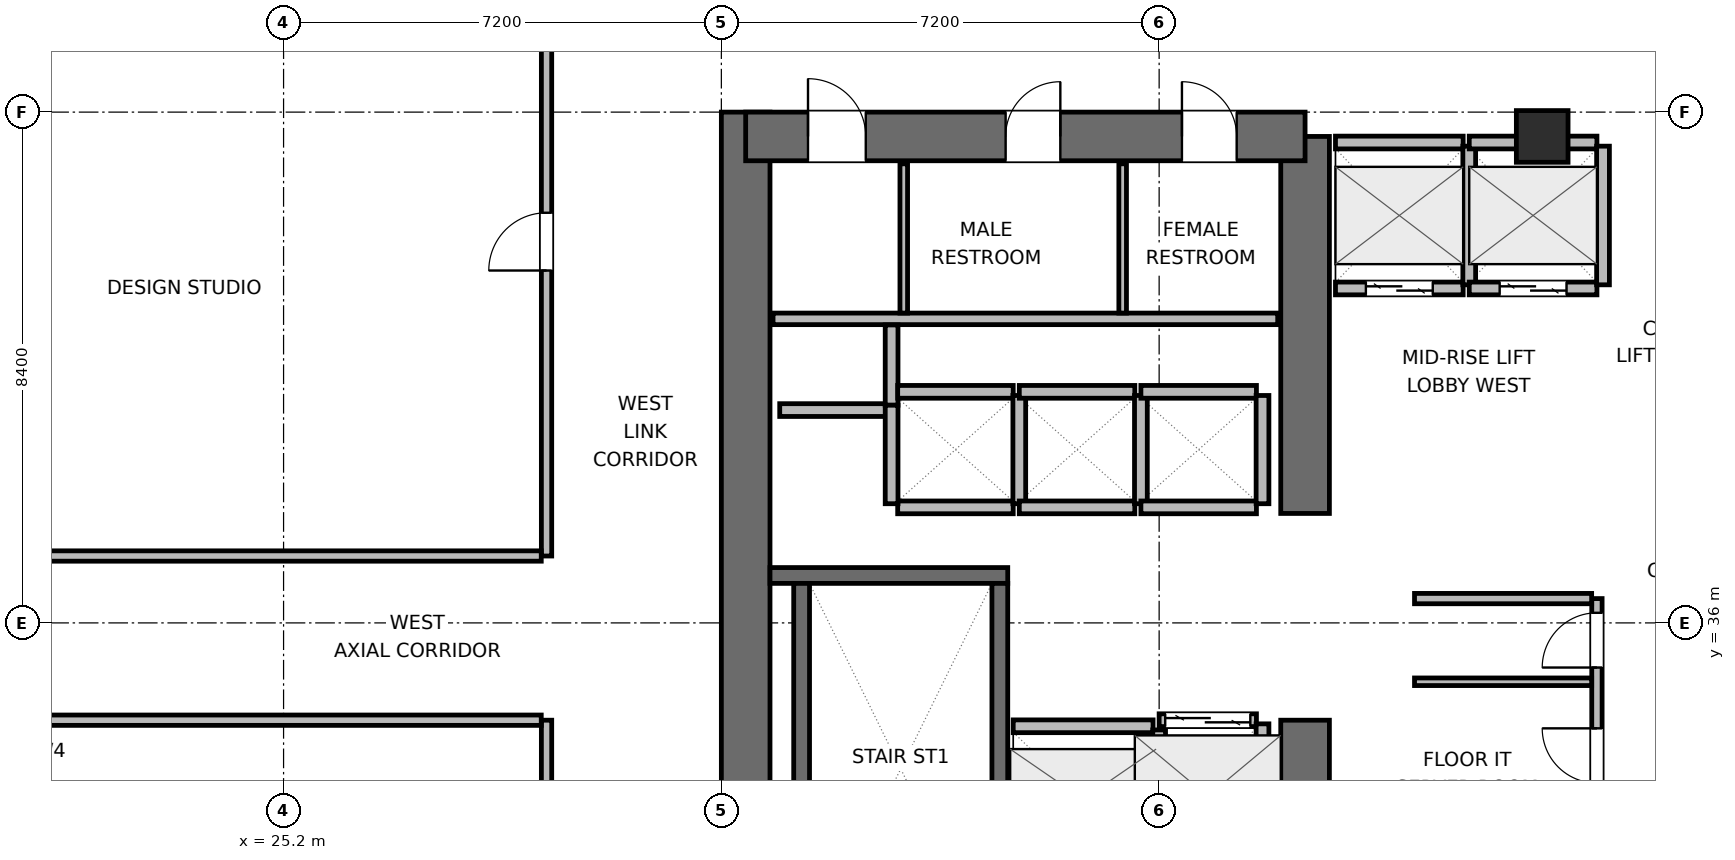
"""IFC4 building model, lengths in metres.
Left out: names, types, materials, properties, quantities, classifications, styles, units other than length and angle.
Written with IfcOpenShell. Run it as: python <this file> out.ifc"""

import sys

from ifc_helpers import new_model, si_unit, direction, frame, frame_2d, origin, origin_2d, place, context, subcontext, project, spatial, rectangle, extrude, element, fill, save


model = new_model("IFC4")
c1 = context("Model", 3, precision=1e-05, world=origin(), true_north=direction((0.0, 1.0)))
c2 = subcontext(c1, "Body", "Model", "MODEL_VIEW")
j1 = project(units=[si_unit("LENGTHUNIT", "METRE"), si_unit("PLANEANGLEUNIT", "RADIAN")], contexts=[c1])
p1 = place(None, origin())
s1 = spatial("IfcSite", under=j1, at=p1, CompositionType="ELEMENT")
p2 = place(p1, origin())
s2 = spatial("IfcBuilding", under=s1, at=p2, CompositionType="ELEMENT")
p3 = place(p2, frame((0.0, 0.0, 174.0)))
s3 = spatial("IfcBuildingStorey", under=s2, at=p3, CompositionType="ELEMENT", Elevation=174.0)
p4 = place(p3, frame((32.8, 27.6, 0.0), z_axis=(0.0, 0.0, 1.0), x_axis=(0.0, 1.0, 0.0)))
e1 = element("IfcWall", 1, at=p4, inside=s3, PredefinedType="SHEAR", context=c2, shape_type="SweptSolid", body=[
    extrude(rectangle(XDim=16.8, YDim=0.8, at=frame_2d((8.4, 0.0))), origin(), (0.0, 0.0, 1.0), 3.9),
])
p5 = place(p3, frame((42.0, 28.0, 0.0), z_axis=(0.0, 0.0, 1.0), x_axis=(0.0, 1.0, 0.0)))
e2 = element("IfcWall", 2, at=p5, inside=s3, PredefinedType="SHEAR", context=c2, shape_type="SweptSolid", body=[
    extrude(rectangle(XDim=6.4, YDim=0.8, at=frame_2d((3.2, 0.0))), origin(), (0.0, 0.0, 1.0), 3.9),
])
p6 = place(p3, frame((42.0, 37.8, 0.0), z_axis=(0.0, 0.0, 1.0), x_axis=(0.0, 1.0, 0.0)))
e3 = element("IfcWall", 3, at=p6, inside=s3, PredefinedType="SHEAR", context=c2, shape_type="SweptSolid", body=[
    extrude(rectangle(XDim=6.2, YDim=0.8, at=frame_2d((3.1, 0.0))), origin(), (0.0, 0.0, 1.0), 3.9),
])
p7 = place(p3, frame((32.8, 44.0, 0.0), z_axis=(0.0, 0.0, 1.0), x_axis=(1.0, 0.0, 0.0)))
e4 = element("IfcWall", 4, at=p7, inside=s3, PredefinedType="SHEAR", context=c2, shape_type="SweptSolid", body=[
    extrude(rectangle(XDim=9.2, YDim=0.8, at=frame_2d((4.6, 0.0))), origin(), (0.0, 0.0, 1.0), 3.9),
])
p8 = place(p7, frame((1.025, 0.0, 0.0)))
e5 = element("IfcOpeningElement", 5, at=p8, cuts=e4, PredefinedType="OPENING", context=c2, shape_type="SweptSolid", body=[
    extrude(rectangle(XDim=0.95, YDim=2.04, at=frame_2d((0.475, 1.02))), frame((0.0, 0.41, 0.0), z_axis=(0.0, -1.0, 0.0), x_axis=(1.0, 0.0, 0.0)), (0.0, 0.0, 1.0), 0.82),
])
p9 = place(p7, frame((4.275, 0.0, 0.0)))
e6 = element("IfcOpeningElement", 6, at=p9, cuts=e4, PredefinedType="OPENING", context=c2, shape_type="SweptSolid", body=[
    extrude(rectangle(XDim=0.9, YDim=2.02, at=frame_2d((0.45, 1.01))), frame((0.0, 0.41, 0.0), z_axis=(0.0, -1.0, 0.0), x_axis=(1.0, 0.0, 0.0)), (0.0, 0.0, 1.0), 0.82),
])
p10 = place(p7, frame((7.175, 0.0, 0.0)))
e7 = element("IfcOpeningElement", 7, at=p10, cuts=e4, PredefinedType="OPENING", context=c2, shape_type="SweptSolid", body=[
    extrude(rectangle(XDim=0.9, YDim=2.02, at=frame_2d((0.45, 1.01))), frame((0.0, 0.41, 0.0), z_axis=(0.0, -1.0, 0.0), x_axis=(1.0, 0.0, 0.0)), (0.0, 0.0, 1.0), 0.82),
])
p11 = place(p3, frame((33.2, 36.78, 0.0), z_axis=(0.0, 0.0, 1.0), x_axis=(1.0, 0.0, 0.0)))
e8 = element("IfcWall", 8, at=p11, inside=s3, PredefinedType="SHEAR", context=c2, shape_type="SweptSolid", body=[
    extrude(rectangle(XDim=3.91, YDim=0.26, at=frame_2d((1.955, 0.0))), origin(), (0.0, 0.0, 1.0), 3.9),
])
p12 = place(p3, frame((33.72, 29.05, 0.0), z_axis=(0.0, 0.0, 1.0), x_axis=(0.0, 1.0, 0.0)))
e9 = element("IfcWall", 9, at=p12, inside=s3, PredefinedType="SHEAR", context=c2, shape_type="SweptSolid", body=[
    extrude(rectangle(XDim=7.6, YDim=0.26, at=frame_2d((3.8, 0.0))), origin(), (0.0, 0.0, 1.0), 3.9),
])
p13 = place(p3, frame((36.98, 29.05, 0.0), z_axis=(0.0, 0.0, 1.0), x_axis=(0.0, 1.0, 0.0)))
e10 = element("IfcWall", 10, at=p13, inside=s3, PredefinedType="SHEAR", context=c2, shape_type="SweptSolid", body=[
    extrude(rectangle(XDim=7.6, YDim=0.26, at=frame_2d((3.8, 0.0))), origin(), (0.0, 0.0, 1.0), 3.9),
])
p14 = place(p13, frame((0.3, 0.0, 0.0)))
e11 = element("IfcOpeningElement", 11, at=p14, cuts=e10, PredefinedType="OPENING", context=c2, shape_type="SweptSolid", body=[
    extrude(rectangle(XDim=1.0, YDim=2.04, at=frame_2d((0.5, 1.02))), frame((0.0, 0.14, 0.0), z_axis=(0.0, -1.0, 0.0), x_axis=(1.0, 0.0, 0.0)), (0.0, 0.0, 1.0), 0.28),
])
p15 = place(p3, frame((45.9, 44.0, 0.0), z_axis=(0.0, 0.0, 1.0), x_axis=(1.0, 0.0, 0.0)))
e12 = element("IfcColumn", 12, at=p15, inside=s3, PredefinedType="COLUMN", context=c2, shape_type="SweptSolid", body=[
    extrude(rectangle(XDim=0.85, YDim=0.85, at=origin_2d()), origin(), (0.0, 0.0, 1.0), 3.9),
])
p16 = place(p3, frame((33.25, 41.0, 0.0), z_axis=(0.0, 0.0, 1.0), x_axis=(1.0, 0.0, 0.0)))
e13 = element("IfcWall", 13, at=p16, inside=s3, PredefinedType="PLUMBINGWALL", context=c2, shape_type="SweptSolid", body=[
    extrude(rectangle(XDim=8.3, YDim=0.19, at=frame_2d((4.15, 0.0))), origin(), (0.0, 0.0, 1.0), 3.68),
])
for number, where, z_axis, x_axis in (
    (14, (35.4, 41.095, 0.0), (0.0, 0.0, 1.0), (0.0, 1.0, 0.0)),
    (15, (39.0, 41.095, 0.0), (0.0, 0.0, 1.0), (0.0, 1.0, 0.0)),
):
    element("IfcWall", number, at=place(p3, frame(where, z_axis=z_axis, x_axis=x_axis)), inside=s3, PredefinedType="PARTITIONING", context=c2, shape_type="SweptSolid", body=[
        extrude(rectangle(XDim=2.455, YDim=0.125, at=frame_2d((1.228, 0.0))), origin(), (0.0, 0.0, 1.0), 3.68),
    ])
p17 = place(p3, frame((33.36, 39.5, 0.0), z_axis=(0.0, 0.0, 1.0), x_axis=(1.0, 0.0, 0.0)))
e16 = element("IfcWall", 16, at=p17, inside=s3, PredefinedType="PARTITIONING", context=c2, shape_type="SweptSolid", body=[
    extrude(rectangle(XDim=1.86, YDim=0.21, at=frame_2d((0.93, 0.0))), origin(), (0.0, 0.0, 1.0), 3.68),
])
p18 = place(p3, frame((35.2, 39.58, 0.0), z_axis=(0.0, 0.0, 1.0), x_axis=(0.0, 1.0, 0.0)))
e17 = element("IfcWall", 17, at=p18, inside=s3, PredefinedType="PARTITIONING", context=c2, shape_type="SweptSolid", body=[
    extrude(rectangle(XDim=1.32, YDim=0.21, at=frame_2d((0.66, 0.0))), origin(), (0.0, 0.0, 1.0), 3.68),
])
p19 = place(p3, frame((37.2, 34.3, 0.0), z_axis=(0.0, 0.0, 1.0), x_axis=(1.0, 0.0, 0.0)))
e18 = element("IfcWall", 18, at=p19, inside=s3, PredefinedType="PARTITIONING", context=c2, shape_type="SweptSolid", body=[
    extrude(rectangle(XDim=2.3, YDim=0.21, at=frame_2d((1.15, 0.0))), origin(), (0.0, 0.0, 1.0), 3.68),
])
p20 = place(p3, frame((39.6, 31.96, 0.0), z_axis=(0.0, 0.0, 1.0), x_axis=(0.0, 1.0, 0.0)))
e19 = element("IfcWall", 19, at=p20, inside=s3, PredefinedType="PARTITIONING", context=c2, shape_type="SweptSolid", body=[
    extrude(rectangle(XDim=2.28, YDim=0.21, at=frame_2d((1.14, 0.0))), origin(), (0.0, 0.0, 1.0), 3.68),
])
p21 = place(p3, frame((39.6, 34.4, 0.0), z_axis=(0.0, 0.0, 1.0), x_axis=(1.0, 0.0, 0.0)))
e20 = element("IfcWall", 20, at=p21, inside=s3, PredefinedType="PARTITIONING", context=c2, shape_type="SweptSolid", body=[
    extrude(rectangle(XDim=1.6, YDim=0.21, at=frame_2d((0.8, 0.0))), origin(), (0.0, 0.0, 1.0), 3.68),
])
p22 = place(p21, frame((0.1, 0.0, 0.0)))
e21 = element("IfcOpeningElement", 21, at=p22, cuts=e20, PredefinedType="OPENING", context=c2, shape_type="SweptSolid", body=[
    extrude(rectangle(XDim=1.4, YDim=2.06, at=frame_2d((0.7, 1.03))), frame((0.0, 0.115, 0.0), z_axis=(0.0, -1.0, 0.0), x_axis=(1.0, 0.0, 0.0)), (0.0, 0.0, 1.0), 0.23),
])
p23 = place(p3, frame((41.3, 31.96, 0.0), z_axis=(0.0, 0.0, 1.0), x_axis=(0.0, 1.0, 0.0)))
e22 = element("IfcWall", 22, at=p23, inside=s3, PredefinedType="PARTITIONING", context=c2, shape_type="SweptSolid", body=[
    extrude(rectangle(XDim=2.38, YDim=0.21, at=frame_2d((1.19, 0.0))), origin(), (0.0, 0.0, 1.0), 3.68),
])
p24 = place(p3, frame((42.5, 41.5, 0.0), z_axis=(0.0, 0.0, 1.0), x_axis=(1.0, 0.0, 0.0)))
e23 = element("IfcWall", 23, at=p24, inside=s3, PredefinedType="PARTITIONING", context=c2, shape_type="SweptSolid", body=[
    extrude(rectangle(XDim=2.1, YDim=0.21, at=frame_2d((1.05, 0.0))), origin(), (0.0, 0.0, 1.0), 3.68),
])
p25 = place(p24, frame((0.5, 0.0, 0.0)))
e24 = element("IfcOpeningElement", 24, at=p25, cuts=e23, PredefinedType="OPENING", context=c2, shape_type="SweptSolid", body=[
    extrude(rectangle(XDim=1.1, YDim=2.04, at=frame_2d((0.55, 1.02))), frame((0.0, 0.115, 0.0), z_axis=(0.0, -1.0, 0.0), x_axis=(1.0, 0.0, 0.0)), (0.0, 0.0, 1.0), 0.23),
])
p26 = place(p3, frame((42.5, 43.9, 0.0), z_axis=(0.0, 0.0, 1.0), x_axis=(1.0, 0.0, 0.0)))
e25 = element("IfcWall", 25, at=p26, inside=s3, PredefinedType="PARTITIONING", context=c2, shape_type="SweptSolid", body=[
    extrude(rectangle(XDim=2.1, YDim=0.21, at=frame_2d((1.05, 0.0))), origin(), (0.0, 0.0, 1.0), 2.765),
])
p27 = place(p3, frame((44.7, 41.56, 0.0), z_axis=(0.0, 0.0, 1.0), x_axis=(0.0, 1.0, 0.0)))
e26 = element("IfcWall", 26, at=p27, inside=s3, PredefinedType="PARTITIONING", context=c2, shape_type="SweptSolid", body=[
    extrude(rectangle(XDim=2.28, YDim=0.21, at=frame_2d((1.14, 0.0))), origin(), (0.0, 0.0, 1.0), 3.68),
])
p28 = place(p3, frame((44.7, 41.5, 0.0), z_axis=(0.0, 0.0, 1.0), x_axis=(1.0, 0.0, 0.0)))
e27 = element("IfcWall", 27, at=p28, inside=s3, PredefinedType="PARTITIONING", context=c2, shape_type="SweptSolid", body=[
    extrude(rectangle(XDim=2.1, YDim=0.21, at=frame_2d((1.05, 0.0))), origin(), (0.0, 0.0, 1.0), 3.68),
])
p29 = place(p28, frame((0.5, 0.0, 0.0)))
e28 = element("IfcOpeningElement", 28, at=p29, cuts=e27, PredefinedType="OPENING", context=c2, shape_type="SweptSolid", body=[
    extrude(rectangle(XDim=1.1, YDim=2.04, at=frame_2d((0.55, 1.02))), frame((0.0, 0.115, 0.0), z_axis=(0.0, -1.0, 0.0), x_axis=(1.0, 0.0, 0.0)), (0.0, 0.0, 1.0), 0.23),
])
p30 = place(p3, frame((44.7, 43.9, 0.0), z_axis=(0.0, 0.0, 1.0), x_axis=(1.0, 0.0, 0.0)))
e29 = element("IfcWall", 29, at=p30, inside=s3, PredefinedType="PARTITIONING", context=c2, shape_type="SweptSolid", body=[
    extrude(rectangle(XDim=2.1, YDim=0.21, at=frame_2d((1.05, 0.0))), origin(), (0.0, 0.0, 1.0), 2.765),
])
p31 = place(p3, frame((46.9, 41.56, 0.0), z_axis=(0.0, 0.0, 1.0), x_axis=(0.0, 1.0, 0.0)))
e30 = element("IfcWall", 30, at=p31, inside=s3, PredefinedType="PARTITIONING", context=c2, shape_type="SweptSolid", body=[
    extrude(rectangle(XDim=2.28, YDim=0.21, at=frame_2d((1.14, 0.0))), origin(), (0.0, 0.0, 1.0), 3.68),
])
for number, where, z_axis, x_axis in (
    (31, (35.3, 37.9, 0.0), (0.0, 0.0, 1.0), (1.0, 0.0, 0.0)),
    (32, (35.3, 39.8, 0.0), (0.0, 0.0, 1.0), (1.0, 0.0, 0.0)),
):
    element("IfcWall", number, at=place(p3, frame(where, z_axis=z_axis, x_axis=x_axis)), inside=s3, PredefinedType="PARTITIONING", context=c2, shape_type="SweptSolid", body=[
        extrude(rectangle(XDim=1.9, YDim=0.21, at=frame_2d((0.95, 0.0))), origin(), (0.0, 0.0, 1.0), 3.68),
    ])
p32 = place(p3, frame((35.2, 37.96, 0.0), z_axis=(0.0, 0.0, 1.0), x_axis=(0.0, 1.0, 0.0)))
e33 = element("IfcWall", 33, at=p32, inside=s3, PredefinedType="PARTITIONING", context=c2, shape_type="SweptSolid", body=[
    extrude(rectangle(XDim=1.62, YDim=0.21, at=frame_2d((0.81, 0.0))), origin(), (0.0, 0.0, 1.0), 3.68),
])
p33 = place(p3, frame((37.3, 37.96, 0.0), z_axis=(0.0, 0.0, 1.0), x_axis=(0.0, 1.0, 0.0)))
e34 = element("IfcWall", 34, at=p33, inside=s3, PredefinedType="PARTITIONING", context=c2, shape_type="SweptSolid", body=[
    extrude(rectangle(XDim=1.78, YDim=0.21, at=frame_2d((0.89, 0.0))), origin(), (0.0, 0.0, 1.0), 3.68),
])
for number, where, z_axis, x_axis in (
    (35, (37.3, 37.9, 0.0), (0.0, 0.0, 1.0), (1.0, 0.0, 0.0)),
    (36, (37.3, 39.8, 0.0), (0.0, 0.0, 1.0), (1.0, 0.0, 0.0)),
):
    element("IfcWall", number, at=place(p3, frame(where, z_axis=z_axis, x_axis=x_axis)), inside=s3, PredefinedType="PARTITIONING", context=c2, shape_type="SweptSolid", body=[
        extrude(rectangle(XDim=1.9, YDim=0.21, at=frame_2d((0.95, 0.0))), origin(), (0.0, 0.0, 1.0), 3.68),
    ])
p34 = place(p3, frame((39.3, 37.96, 0.0), z_axis=(0.0, 0.0, 1.0), x_axis=(0.0, 1.0, 0.0)))
e37 = element("IfcWall", 37, at=p34, inside=s3, PredefinedType="PARTITIONING", context=c2, shape_type="SweptSolid", body=[
    extrude(rectangle(XDim=1.78, YDim=0.21, at=frame_2d((0.89, 0.0))), origin(), (0.0, 0.0, 1.0), 3.68),
])
for number, where, z_axis, x_axis in (
    (38, (39.3, 37.9, 0.0), (0.0, 0.0, 1.0), (1.0, 0.0, 0.0)),
    (39, (39.3, 39.8, 0.0), (0.0, 0.0, 1.0), (1.0, 0.0, 0.0)),
):
    element("IfcWall", number, at=place(p3, frame(where, z_axis=z_axis, x_axis=x_axis)), inside=s3, PredefinedType="PARTITIONING", context=c2, shape_type="SweptSolid", body=[
        extrude(rectangle(XDim=1.9, YDim=0.21, at=frame_2d((0.95, 0.0))), origin(), (0.0, 0.0, 1.0), 3.68),
    ])
p35 = place(p3, frame((41.3, 37.96, 0.0), z_axis=(0.0, 0.0, 1.0), x_axis=(0.0, 1.0, 0.0)))
e40 = element("IfcWall", 40, at=p35, inside=s3, PredefinedType="PARTITIONING", context=c2, shape_type="SweptSolid", body=[
    extrude(rectangle(XDim=1.78, YDim=0.21, at=frame_2d((0.89, 0.0))), origin(), (0.0, 0.0, 1.0), 3.68),
])
p36 = place(p3, frame((46.8, 32.6, 0.0), z_axis=(0.0, 0.0, 1.0), x_axis=(0.0, 1.0, 0.0)))
e41 = element("IfcWall", 41, at=p36, inside=s3, PredefinedType="PARTITIONING", context=c2, shape_type="SweptSolid", body=[
    extrude(rectangle(XDim=3.8, YDim=0.17, at=frame_2d((1.9, 0.0))), origin(), (0.0, 0.0, 1.0), 3.68),
])
p37 = place(p36, frame((0.766, 0.0, 0.0)))
e42 = element("IfcOpeningElement", 42, at=p37, cuts=e41, PredefinedType="OPENING", context=c2, shape_type="SweptSolid", body=[
    extrude(rectangle(XDim=0.9, YDim=2.02, at=frame_2d((0.45, 1.01))), frame((0.0, 0.095, 0.0), z_axis=(0.0, -1.0, 0.0), x_axis=(1.0, 0.0, 0.0)), (0.0, 0.0, 1.0), 0.19),
])
p38 = place(p36, frame((2.666, 0.0, 0.0)))
e43 = element("IfcOpeningElement", 43, at=p38, cuts=e41, PredefinedType="OPENING", context=c2, shape_type="SweptSolid", body=[
    extrude(rectangle(XDim=0.9, YDim=2.02, at=frame_2d((0.45, 1.01))), frame((0.0, 0.095, 0.0), z_axis=(0.0, -1.0, 0.0), x_axis=(1.0, 0.0, 0.0)), (0.0, 0.0, 1.0), 0.19),
])
p39 = place(p3, frame((43.8, 36.4, 0.0), z_axis=(0.0, 0.0, 1.0), x_axis=(1.0, 0.0, 0.0)))
e44 = element("IfcWall", 44, at=p39, inside=s3, PredefinedType="PARTITIONING", context=c2, shape_type="SweptSolid", body=[
    extrude(rectangle(XDim=2.913, YDim=0.17, at=frame_2d((1.457, 0.0))), origin(), (0.0, 0.0, 1.0), 3.68),
])
p40 = place(p3, frame((43.8, 35.032, 0.0), z_axis=(0.0, 0.0, 1.0), x_axis=(1.0, 0.0, 0.0)))
e45 = element("IfcWall", 45, at=p40, inside=s3, PredefinedType="PARTITIONING", context=c2, shape_type="SweptSolid", body=[
    extrude(rectangle(XDim=2.913, YDim=0.125, at=frame_2d((1.457, 0.0))), origin(), (0.0, 0.0, 1.0), 3.68),
])
p41 = place(p3, frame((29.525, 24.647, 0.0), z_axis=(0.0, 0.0, 1.0), x_axis=(0.0, 1.0, 0.0)))
e46 = element("IfcWall", 46, at=p41, inside=s3, PredefinedType="PARTITIONING", context=c2, shape_type="SweptSolid", body=[
    extrude(rectangle(XDim=9.753, YDim=0.17, at=frame_2d((4.876, 0.0))), origin(), (0.0, 0.0, 1.0), 3.68),
])
p42 = place(p41, frame((4.358, 0.0, 0.0)))
e47 = element("IfcOpeningElement", 47, at=p42, cuts=e46, PredefinedType="OPENING", context=c2, shape_type="SweptSolid", body=[
    extrude(rectangle(XDim=0.95, YDim=2.04, at=frame_2d((0.475, 1.02))), frame((0.0, 0.095, 0.0), z_axis=(0.0, -1.0, 0.0), x_axis=(1.0, 0.0, 0.0)), (0.0, 0.0, 1.0), 0.19),
])
p43 = place(p3, frame((29.525, 37.1, 0.0), z_axis=(0.0, 0.0, 1.0), x_axis=(0.0, 1.0, 0.0)))
e48 = element("IfcWall", 48, at=p43, inside=s3, PredefinedType="PARTITIONING", context=c2, shape_type="SweptSolid", body=[
    extrude(rectangle(XDim=10.253, YDim=0.17, at=frame_2d((5.126, 0.0))), origin(), (0.0, 0.0, 1.0), 3.68),
])
p44 = place(p43, frame((4.695, 0.0, 0.0)))
e49 = element("IfcOpeningElement", 49, at=p44, cuts=e48, PredefinedType="OPENING", context=c2, shape_type="SweptSolid", body=[
    extrude(rectangle(XDim=0.95, YDim=2.04, at=frame_2d((0.475, 1.02))), frame((0.0, 0.095, 0.0), z_axis=(0.0, -1.0, 0.0), x_axis=(1.0, 0.0, 0.0)), (0.0, 0.0, 1.0), 0.19),
])
p45 = place(p3, frame((20.24, 34.4, 0.0), z_axis=(0.0, 0.0, 1.0), x_axis=(1.0, 0.0, 0.0)))
e50 = element("IfcWall", 50, at=p45, inside=s3, PredefinedType="PARTITIONING", context=c2, shape_type="SweptSolid", body=[
    extrude(rectangle(XDim=9.198, YDim=0.17, at=frame_2d((4.599, 0.0))), origin(), (0.0, 0.0, 1.0), 3.68),
])
p46 = place(p3, frame((18.225, 37.1, 0.0), z_axis=(0.0, 0.0, 1.0), x_axis=(1.0, 0.0, 0.0)))
e51 = element("IfcWall", 51, at=p46, inside=s3, PredefinedType="PARTITIONING", context=c2, shape_type="SweptSolid", body=[
    extrude(rectangle(XDim=11.213, YDim=0.17, at=frame_2d((5.606, 0.0))), origin(), (0.0, 0.0, 1.0), 3.68),
])
p47 = place(p22, origin())
e52 = element("IfcDoor", 52, at=p47, inside=s3, OperationType="DOUBLE_DOOR_SLIDING", PredefinedType="DOOR", context=c2, shape_type="SweptSolid", body=[
    extrude(rectangle(XDim=1.4, YDim=2.06, at=frame_2d((0.7, 1.03))), frame((0.0, 0.025, 0.0), z_axis=(0.0, -1.0, 0.0), x_axis=(1.0, 0.0, 0.0)), (0.0, 0.0, 1.0), 0.05),
])
fill(e21, e52)
p48 = place(p25, origin())
e53 = element("IfcDoor", 53, at=p48, inside=s3, OperationType="DOUBLE_DOOR_SLIDING", PredefinedType="DOOR", context=c2, shape_type="SweptSolid", body=[
    extrude(rectangle(XDim=1.1, YDim=2.04, at=frame_2d((0.55, 1.02))), frame((0.0, 0.025, 0.0), z_axis=(0.0, -1.0, 0.0), x_axis=(1.0, 0.0, 0.0)), (0.0, 0.0, 1.0), 0.05),
])
fill(e24, e53)
p49 = place(p29, origin())
e54 = element("IfcDoor", 54, at=p49, inside=s3, OperationType="DOUBLE_DOOR_SLIDING", PredefinedType="DOOR", context=c2, shape_type="SweptSolid", body=[
    extrude(rectangle(XDim=1.1, YDim=2.04, at=frame_2d((0.55, 1.02))), frame((0.0, 0.025, 0.0), z_axis=(0.0, -1.0, 0.0), x_axis=(1.0, 0.0, 0.0)), (0.0, 0.0, 1.0), 0.05),
])
fill(e28, e54)
p50 = place(p8, origin())
e55 = element("IfcDoor", 55, at=p50, inside=s3, OperationType="SINGLE_SWING_LEFT", PredefinedType="DOOR", context=c2, shape_type="SweptSolid", body=[
    extrude(rectangle(XDim=0.95, YDim=2.04, at=frame_2d((0.475, 1.02))), frame((0.0, 0.025, 0.0), z_axis=(0.0, -1.0, 0.0), x_axis=(1.0, 0.0, 0.0)), (0.0, 0.0, 1.0), 0.05),
])
fill(e5, e55)
p51 = place(p9, origin())
e56 = element("IfcDoor", 56, at=p51, inside=s3, OperationType="SINGLE_SWING_RIGHT", PredefinedType="DOOR", context=c2, shape_type="SweptSolid", body=[
    extrude(rectangle(XDim=0.9, YDim=2.02, at=frame_2d((0.45, 1.01))), frame((0.0, 0.025, 0.0), z_axis=(0.0, -1.0, 0.0), x_axis=(1.0, 0.0, 0.0)), (0.0, 0.0, 1.0), 0.05),
])
fill(e6, e56)
p52 = place(p10, origin())
e57 = element("IfcDoor", 57, at=p52, inside=s3, OperationType="SINGLE_SWING_LEFT", PredefinedType="DOOR", context=c2, shape_type="SweptSolid", body=[
    extrude(rectangle(XDim=0.9, YDim=2.02, at=frame_2d((0.45, 1.01))), frame((0.0, 0.025, 0.0), z_axis=(0.0, -1.0, 0.0), x_axis=(1.0, 0.0, 0.0)), (0.0, 0.0, 1.0), 0.05),
])
fill(e7, e57)
p53 = place(p37, origin())
e58 = element("IfcDoor", 58, at=p53, inside=s3, OperationType="SINGLE_SWING_RIGHT", PredefinedType="DOOR", context=c2, shape_type="SweptSolid", body=[
    extrude(rectangle(XDim=0.9, YDim=2.02, at=frame_2d((0.45, 1.01))), frame((0.0, 0.025, 0.0), z_axis=(0.0, -1.0, 0.0), x_axis=(1.0, 0.0, 0.0)), (0.0, 0.0, 1.0), 0.05),
])
fill(e42, e58)
p54 = place(p38, origin())
e59 = element("IfcDoor", 59, at=p54, inside=s3, OperationType="SINGLE_SWING_LEFT", PredefinedType="DOOR", context=c2, shape_type="SweptSolid", body=[
    extrude(rectangle(XDim=0.9, YDim=2.02, at=frame_2d((0.45, 1.01))), frame((0.0, 0.025, 0.0), z_axis=(0.0, -1.0, 0.0), x_axis=(1.0, 0.0, 0.0)), (0.0, 0.0, 1.0), 0.05),
])
fill(e43, e59)
p55 = place(p44, origin())
e60 = element("IfcDoor", 60, at=p55, inside=s3, OperationType="SINGLE_SWING_LEFT", PredefinedType="DOOR", context=c2, shape_type="SweptSolid", body=[
    extrude(rectangle(XDim=0.95, YDim=2.04, at=frame_2d((0.475, 1.02))), frame((0.0, 0.025, 0.0), z_axis=(0.0, -1.0, 0.0), x_axis=(1.0, 0.0, 0.0)), (0.0, 0.0, 1.0), 0.05),
])
fill(e49, e60)
save(model, sys.argv[1])
